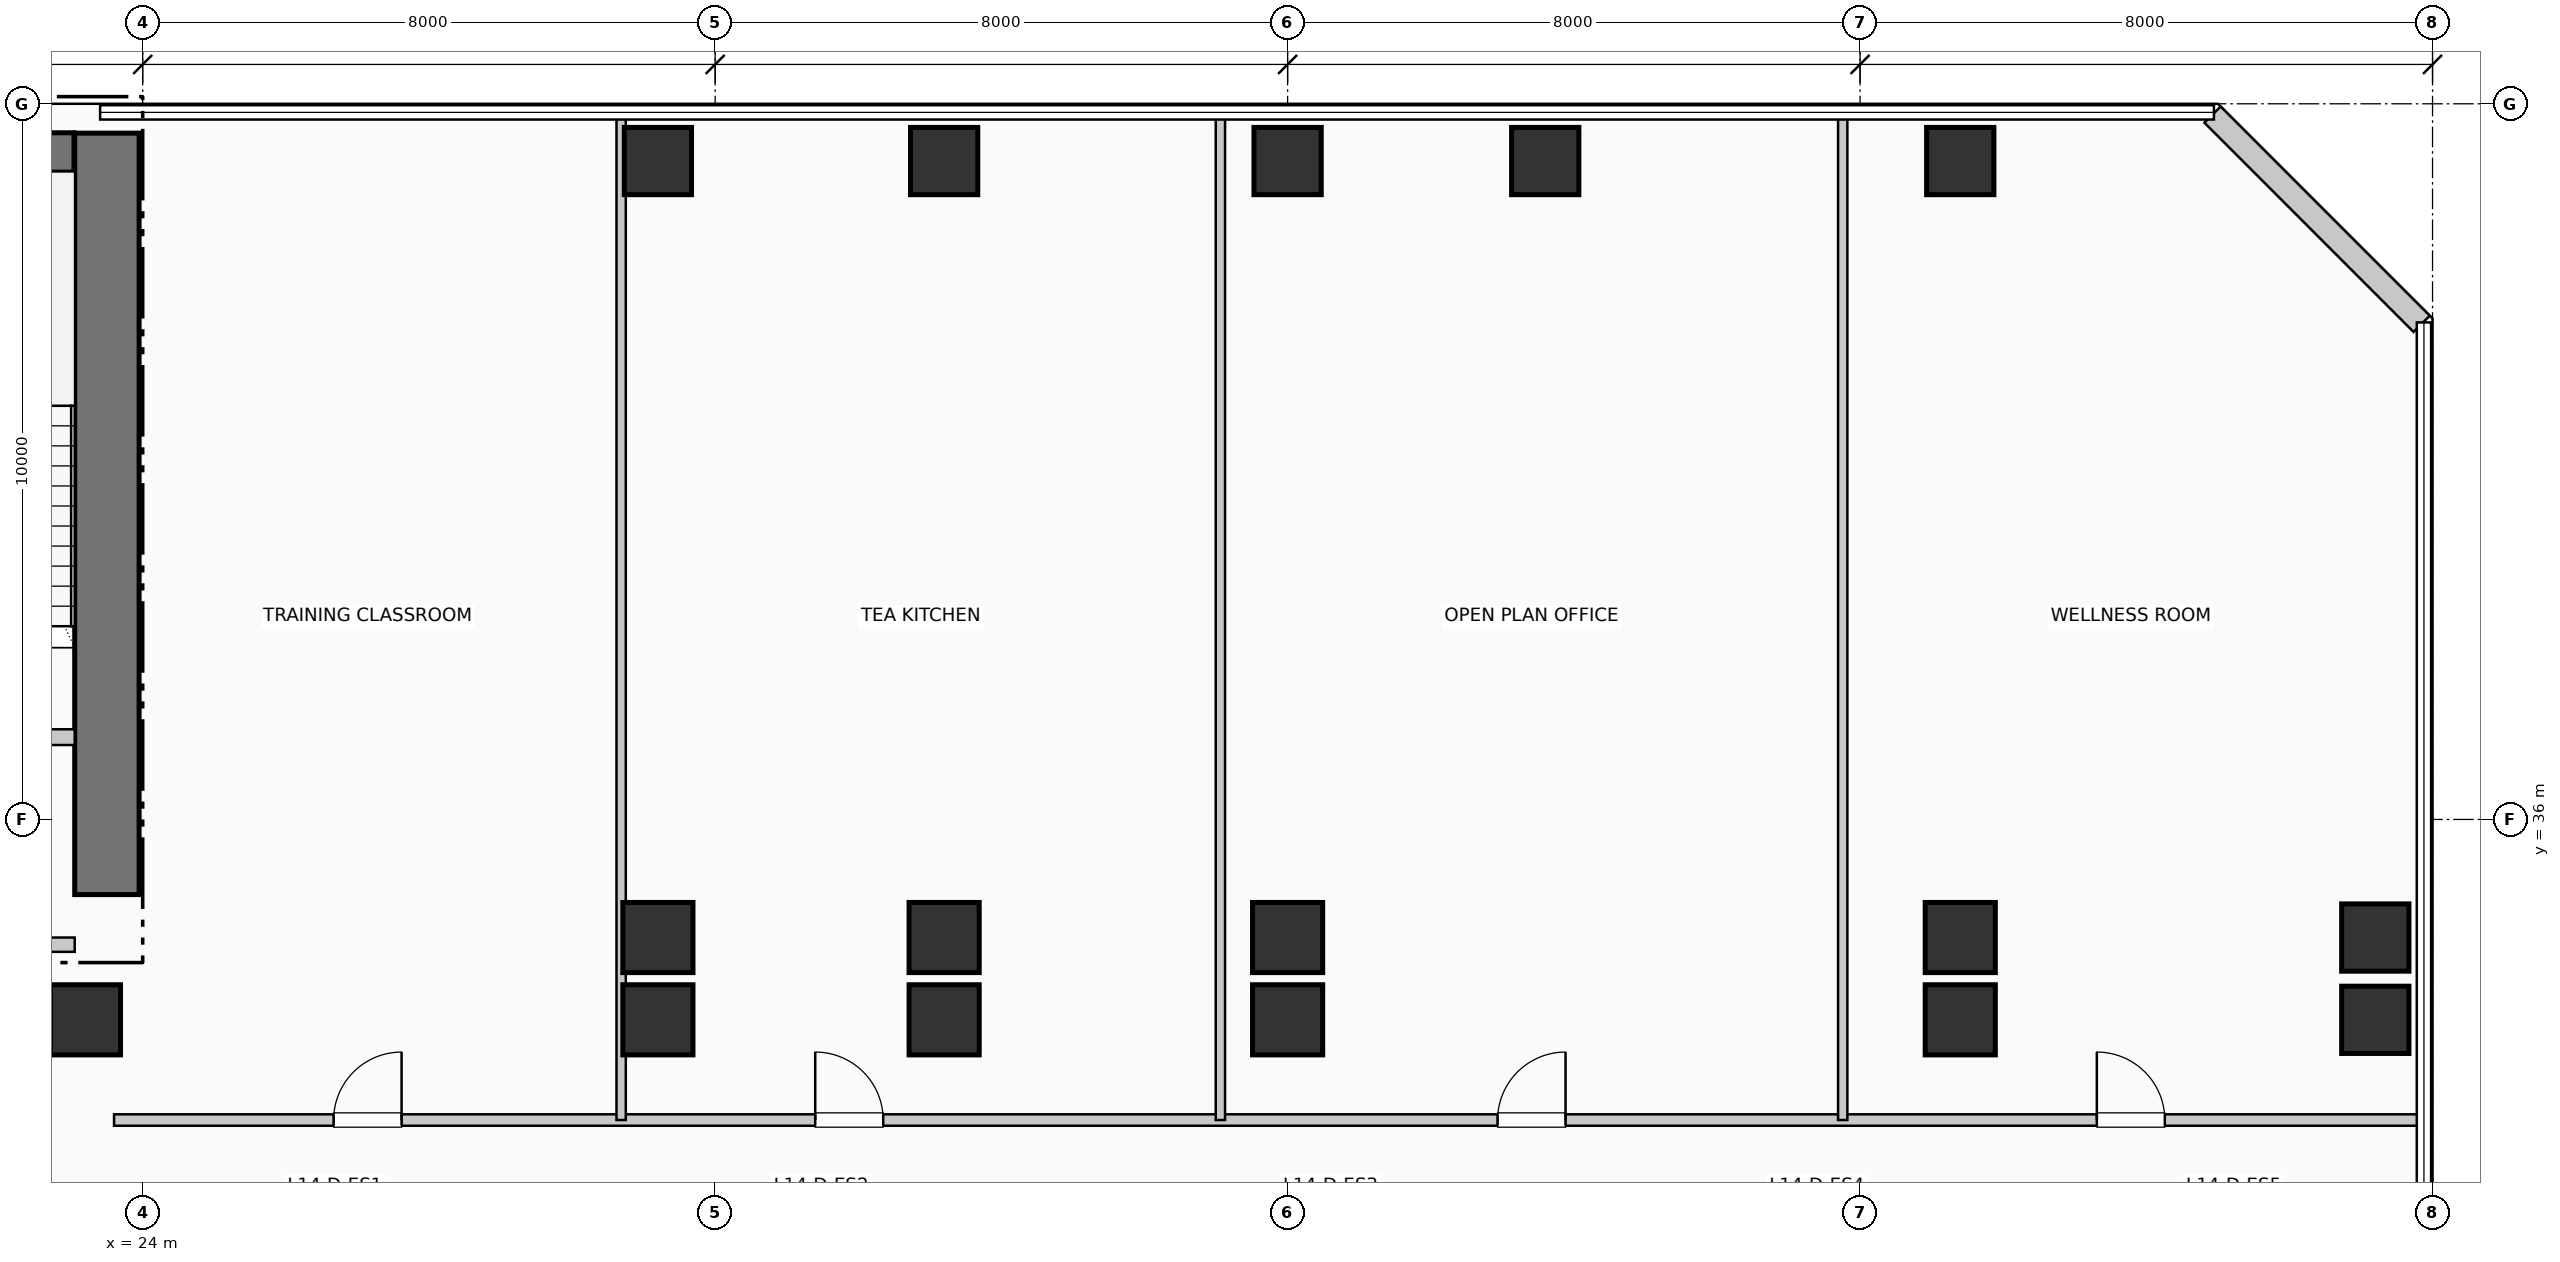
"""IFC4 building model, lengths in metres.
Left out: names, types, materials, properties, quantities, classifications, styles, units other than length and angle.
Written with IfcOpenShell. Run it as: python <this file> out.ifc"""

import sys

from ifc_helpers import new_model, si_unit, direction, frame, frame_2d, origin, origin_2d, place, context, subcontext, project, spatial, rectangle, extrude, element, fill, save


model = new_model("IFC4")
c1 = context("Model", 3, precision=1e-05, world=origin(), true_north=direction((0.0, 1.0)))
c2 = subcontext(c1, "Body", "Model", "MODEL_VIEW")
j1 = project(units=[si_unit("LENGTHUNIT", "METRE"), si_unit("PLANEANGLEUNIT", "RADIAN")], contexts=[c1])
p1 = place(None, origin())
s1 = spatial("IfcSite", under=j1, at=p1, CompositionType="ELEMENT")
p2 = place(p1, origin())
s2 = spatial("IfcBuilding", under=s1, at=p2, CompositionType="ELEMENT")
p3 = place(p2, frame((0.0, 0.0, 62.04)))
s3 = spatial("IfcBuildingStorey", under=s2, at=p3, CompositionType="ELEMENT", Elevation=62.04)
p4 = place(p3, frame((23.5, 34.95, 0.0), z_axis=(0.0, 0.0, 1.0), x_axis=(0.0, 1.0, 0.0)))
e1 = element("IfcWall", 1, at=p4, inside=s3, PredefinedType="SHEAR", context=c2, shape_type="SweptSolid", body=[
    extrude(rectangle(XDim=10.64, YDim=0.9, at=frame_2d((5.32, 0.0))), origin(), (0.0, 0.0, 1.0), 3.96),
])
p5 = place(p3, frame((19.35, 45.32, 0.0), z_axis=(0.0, 0.0, 1.0), x_axis=(1.0, 0.0, 0.0)))
e2 = element("IfcWall", 2, at=p5, inside=s3, PredefinedType="SHEAR", context=c2, shape_type="SweptSolid", body=[
    extrude(rectangle(XDim=3.69, YDim=0.55, at=frame_2d((1.845, 0.0))), origin(), (0.0, 0.0, 1.0), 3.96),
])
p6 = place(p5, frame((1.15, 0.0, 1.05)))
e3 = element("IfcOpeningElement", 3, at=p6, cuts=e2, PredefinedType="OPENING", context=c2, shape_type="SweptSolid", body=[
    extrude(rectangle(XDim=1.4, YDim=1.8, at=frame_2d((0.7, 0.9))), frame((0.0, 0.285, 0.0), z_axis=(0.0, -1.0, 0.0), x_axis=(1.0, 0.0, 0.0)), (0.0, 0.0, 1.0), 0.57),
])
for number, where, z_axis, x_axis in (
    (4, (23.2, 33.2, 0.0), (0.0, 0.0, 1.0), (1.0, 0.0, 0.0)),
    (5, (31.2, 33.2, 0.0), (0.0, 0.0, 1.0), (1.0, 0.0, 0.0)),
    (6, (31.2, 34.35, 0.0), (0.0, 0.0, 1.0), (1.0, 0.0, 0.0)),
):
    element("IfcColumn", number, at=place(p3, frame(where, z_axis=z_axis, x_axis=x_axis)), inside=s3, PredefinedType="COLUMN", context=c2, shape_type="SweptSolid", body=[
        extrude(rectangle(XDim=0.98, YDim=0.98, at=origin_2d()), origin(), (0.0, 0.0, 1.0), 3.96),
    ])
p7 = place(p3, frame((31.2, 45.2, 0.0), z_axis=(0.0, 0.0, 1.0), x_axis=(1.0, 0.0, 0.0)))
e7 = element("IfcColumn", 7, at=p7, inside=s3, PredefinedType="COLUMN", context=c2, shape_type="SweptSolid", body=[
    extrude(rectangle(XDim=0.94, YDim=0.94, at=origin_2d()), origin(), (0.0, 0.0, 1.0), 3.96),
])
for number, where, z_axis, x_axis in (
    (8, (35.2, 33.2, 0.0), (0.0, 0.0, 1.0), (1.0, 0.0, 0.0)),
    (9, (35.2, 34.35, 0.0), (0.0, 0.0, 1.0), (1.0, 0.0, 0.0)),
):
    element("IfcColumn", number, at=place(p3, frame(where, z_axis=z_axis, x_axis=x_axis)), inside=s3, PredefinedType="COLUMN", context=c2, shape_type="SweptSolid", body=[
        extrude(rectangle(XDim=0.98, YDim=0.98, at=origin_2d()), origin(), (0.0, 0.0, 1.0), 3.96),
    ])
p8 = place(p3, frame((35.2, 45.2, 0.0), z_axis=(0.0, 0.0, 1.0), x_axis=(1.0, 0.0, 0.0)))
e10 = element("IfcColumn", 10, at=p8, inside=s3, PredefinedType="COLUMN", context=c2, shape_type="SweptSolid", body=[
    extrude(rectangle(XDim=0.94, YDim=0.94, at=origin_2d()), origin(), (0.0, 0.0, 1.0), 3.96),
])
for number, where, z_axis, x_axis in (
    (11, (40.0, 33.2, 0.0), (0.0, 0.0, 1.0), (1.0, 0.0, 0.0)),
    (12, (40.0, 34.35, 0.0), (0.0, 0.0, 1.0), (1.0, 0.0, 0.0)),
):
    element("IfcColumn", number, at=place(p3, frame(where, z_axis=z_axis, x_axis=x_axis)), inside=s3, PredefinedType="COLUMN", context=c2, shape_type="SweptSolid", body=[
        extrude(rectangle(XDim=0.98, YDim=0.98, at=origin_2d()), origin(), (0.0, 0.0, 1.0), 3.96),
    ])
for number, where, z_axis, x_axis in (
    (13, (40.0, 45.2, 0.0), (0.0, 0.0, 1.0), (1.0, 0.0, 0.0)),
    (14, (43.6, 45.2, 0.0), (0.0, 0.0, 1.0), (1.0, 0.0, 0.0)),
):
    element("IfcColumn", number, at=place(p3, frame(where, z_axis=z_axis, x_axis=x_axis)), inside=s3, PredefinedType="COLUMN", context=c2, shape_type="SweptSolid", body=[
        extrude(rectangle(XDim=0.94, YDim=0.94, at=origin_2d()), origin(), (0.0, 0.0, 1.0), 3.96),
    ])
for number, where, z_axis, x_axis in (
    (15, (49.4, 33.2, 0.0), (0.0, 0.0, 1.0), (1.0, 0.0, 0.0)),
    (16, (49.4, 34.35, 0.0), (0.0, 0.0, 1.0), (1.0, 0.0, 0.0)),
):
    element("IfcColumn", number, at=place(p3, frame(where, z_axis=z_axis, x_axis=x_axis)), inside=s3, PredefinedType="COLUMN", context=c2, shape_type="SweptSolid", body=[
        extrude(rectangle(XDim=0.98, YDim=0.98, at=origin_2d()), origin(), (0.0, 0.0, 1.0), 3.96),
    ])
for number, where, z_axis, x_axis in (
    (17, (49.4, 45.2, 0.0), (0.0, 0.0, 1.0), (1.0, 0.0, 0.0)),
    (18, (55.2, 33.2, 0.0), (0.0, 0.0, 1.0), (1.0, 0.0, 0.0)),
    (19, (55.2, 34.35, 0.0), (0.0, 0.0, 1.0), (1.0, 0.0, 0.0)),
):
    element("IfcColumn", number, at=place(p3, frame(where, z_axis=z_axis, x_axis=x_axis)), inside=s3, PredefinedType="COLUMN", context=c2, shape_type="SweptSolid", body=[
        extrude(rectangle(XDim=0.94, YDim=0.94, at=origin_2d()), origin(), (0.0, 0.0, 1.0), 3.96),
    ])
p9 = place(p3, frame((55.848, 42.926, 0.0), z_axis=(0.0, 0.0, 1.0), x_axis=(-0.707106781187, 0.707106781187, 0.0)))
e20 = element("IfcWall", 20, at=p9, inside=s3, PredefinedType="SOLIDWALL", context=c2, shape_type="SweptSolid", body=[
    extrude(rectangle(XDim=4.133, YDim=0.32, at=frame_2d((2.066, 0.0))), origin(), (0.0, 0.0, 1.0), 3.71),
])
p10 = place(p3, frame((19.9, 37.15, 0.0), z_axis=(0.0, 0.0, 1.0), x_axis=(1.0, 0.0, 0.0)))
e21 = element("IfcWall", 21, at=p10, inside=s3, PredefinedType="PARTITIONING", context=c2, shape_type="SweptSolid", body=[
    extrude(rectangle(XDim=3.15, YDim=0.22, at=frame_2d((1.575, 0.0))), origin(), (0.0, 0.0, 1.0), 3.71),
])
p11 = place(p10, frame((2.05, 0.0, 0.0), z_axis=(0.0, 0.0, 1.0), x_axis=(-1.0, 0.0, 0.0)))
e22 = element("IfcOpeningElement", 22, at=p11, cuts=e21, PredefinedType="OPENING", context=c2, shape_type="SweptSolid", body=[
    extrude(rectangle(XDim=1.05, YDim=2.15, at=frame_2d((0.525, 1.075))), frame((0.0, 0.12, 0.0), z_axis=(0.0, -1.0, 0.0), x_axis=(1.0, 0.0, 0.0)), (0.0, 0.0, 1.0), 0.24),
])
p12 = place(p3, frame((19.8, 34.25, 0.0), z_axis=(0.0, 0.0, 1.0), x_axis=(1.0, 0.0, 0.0)))
e23 = element("IfcWall", 23, at=p12, inside=s3, PredefinedType="PARTITIONING", context=c2, shape_type="SweptSolid", body=[
    extrude(rectangle(XDim=3.25, YDim=0.2, at=frame_2d((1.625, 0.0))), origin(), (0.0, 0.0, 1.0), 3.71),
])
p13 = place(p12, frame((2.15, 0.0, 0.0), z_axis=(0.0, 0.0, 1.0), x_axis=(-1.0, 0.0, 0.0)))
e24 = element("IfcOpeningElement", 24, at=p13, cuts=e23, PredefinedType="OPENING", context=c2, shape_type="SweptSolid", body=[
    extrude(rectangle(XDim=1.1, YDim=2.15, at=frame_2d((0.55, 1.075))), frame((0.0, 0.11, 0.0), z_axis=(0.0, -1.0, 0.0), x_axis=(1.0, 0.0, 0.0)), (0.0, 0.0, 1.0), 0.22),
])
p14 = place(p3, frame((23.6, 31.8, 0.0), z_axis=(0.0, 0.0, 1.0), x_axis=(1.0, 0.0, 0.0)))
e25 = element("IfcWall", 25, at=p14, inside=s3, PredefinedType="PARTITIONING", context=c2, shape_type="SweptSolid", body=[
    extrude(rectangle(XDim=32.21, YDim=0.16, at=frame_2d((16.105, 0.0))), origin(), (0.0, 0.0, 1.0), 3.71),
])
p15 = place(p14, frame((3.068, 0.0, 0.0)))
e26 = element("IfcOpeningElement", 26, at=p15, cuts=e25, PredefinedType="OPENING", context=c2, shape_type="SweptSolid", body=[
    extrude(rectangle(XDim=0.95, YDim=2.15, at=frame_2d((0.475, 1.075))), frame((0.0, 0.09, 0.0), z_axis=(0.0, -1.0, 0.0), x_axis=(1.0, 0.0, 0.0)), (0.0, 0.0, 1.0), 0.18),
])
p16 = place(p14, frame((9.799, 0.0, 0.0)))
e27 = element("IfcOpeningElement", 27, at=p16, cuts=e25, PredefinedType="OPENING", context=c2, shape_type="SweptSolid", body=[
    extrude(rectangle(XDim=0.95, YDim=2.15, at=frame_2d((0.475, 1.075))), frame((0.0, 0.09, 0.0), z_axis=(0.0, -1.0, 0.0), x_axis=(1.0, 0.0, 0.0)), (0.0, 0.0, 1.0), 0.18),
])
p17 = place(p14, frame((19.334, 0.0, 0.0)))
e28 = element("IfcOpeningElement", 28, at=p17, cuts=e25, PredefinedType="OPENING", context=c2, shape_type="SweptSolid", body=[
    extrude(rectangle(XDim=0.95, YDim=2.15, at=frame_2d((0.475, 1.075))), frame((0.0, 0.09, 0.0), z_axis=(0.0, -1.0, 0.0), x_axis=(1.0, 0.0, 0.0)), (0.0, 0.0, 1.0), 0.18),
])
p18 = place(p14, frame((27.709, 0.0, 0.0)))
e29 = element("IfcOpeningElement", 29, at=p18, cuts=e25, PredefinedType="OPENING", context=c2, shape_type="SweptSolid", body=[
    extrude(rectangle(XDim=0.95, YDim=2.15, at=frame_2d((0.475, 1.075))), frame((0.0, 0.09, 0.0), z_axis=(0.0, -1.0, 0.0), x_axis=(1.0, 0.0, 0.0)), (0.0, 0.0, 1.0), 0.18),
])
for number, where, z_axis, x_axis in (
    (30, (30.686, 31.8, 0.0), (0.0, 0.0, 1.0), (0.0, 1.0, 0.0)),
    (31, (39.061, 31.8, 0.0), (0.0, 0.0, 1.0), (0.0, 1.0, 0.0)),
    (32, (47.758, 31.8, 0.0), (0.0, 0.0, 1.0), (0.0, 1.0, 0.0)),
):
    element("IfcWall", number, at=place(p3, frame(where, z_axis=z_axis, x_axis=x_axis)), inside=s3, PredefinedType="PARTITIONING", context=c2, shape_type="SweptSolid", body=[
        extrude(rectangle(XDim=14.01, YDim=0.13, at=frame_2d((7.005, 0.0))), origin(), (0.0, 0.0, 1.0), 3.71),
    ])
p19 = place(p15, origin())
e33 = element("IfcDoor", 33, at=p19, inside=s3, OperationType="SINGLE_SWING_RIGHT", PredefinedType="DOOR", context=c2, shape_type="SweptSolid", body=[
    extrude(rectangle(XDim=0.95, YDim=2.15, at=frame_2d((0.475, 1.075))), frame((0.0, 0.025, 0.0), z_axis=(0.0, -1.0, 0.0), x_axis=(1.0, 0.0, 0.0)), (0.0, 0.0, 1.0), 0.05),
])
fill(e26, e33)
p20 = place(p16, origin())
e34 = element("IfcDoor", 34, at=p20, inside=s3, OperationType="SINGLE_SWING_LEFT", PredefinedType="DOOR", context=c2, shape_type="SweptSolid", body=[
    extrude(rectangle(XDim=0.95, YDim=2.15, at=frame_2d((0.475, 1.075))), frame((0.0, 0.025, 0.0), z_axis=(0.0, -1.0, 0.0), x_axis=(1.0, 0.0, 0.0)), (0.0, 0.0, 1.0), 0.05),
])
fill(e27, e34)
p21 = place(p17, origin())
e35 = element("IfcDoor", 35, at=p21, inside=s3, OperationType="SINGLE_SWING_RIGHT", PredefinedType="DOOR", context=c2, shape_type="SweptSolid", body=[
    extrude(rectangle(XDim=0.95, YDim=2.15, at=frame_2d((0.475, 1.075))), frame((0.0, 0.025, 0.0), z_axis=(0.0, -1.0, 0.0), x_axis=(1.0, 0.0, 0.0)), (0.0, 0.0, 1.0), 0.05),
])
fill(e28, e35)
p22 = place(p18, origin())
e36 = element("IfcDoor", 36, at=p22, inside=s3, OperationType="SINGLE_SWING_LEFT", PredefinedType="DOOR", context=c2, shape_type="SweptSolid", body=[
    extrude(rectangle(XDim=0.95, YDim=2.15, at=frame_2d((0.475, 1.075))), frame((0.0, 0.025, 0.0), z_axis=(0.0, -1.0, 0.0), x_axis=(1.0, 0.0, 0.0)), (0.0, 0.0, 1.0), 0.05),
])
fill(e29, e36)
save(model, sys.argv[1])
